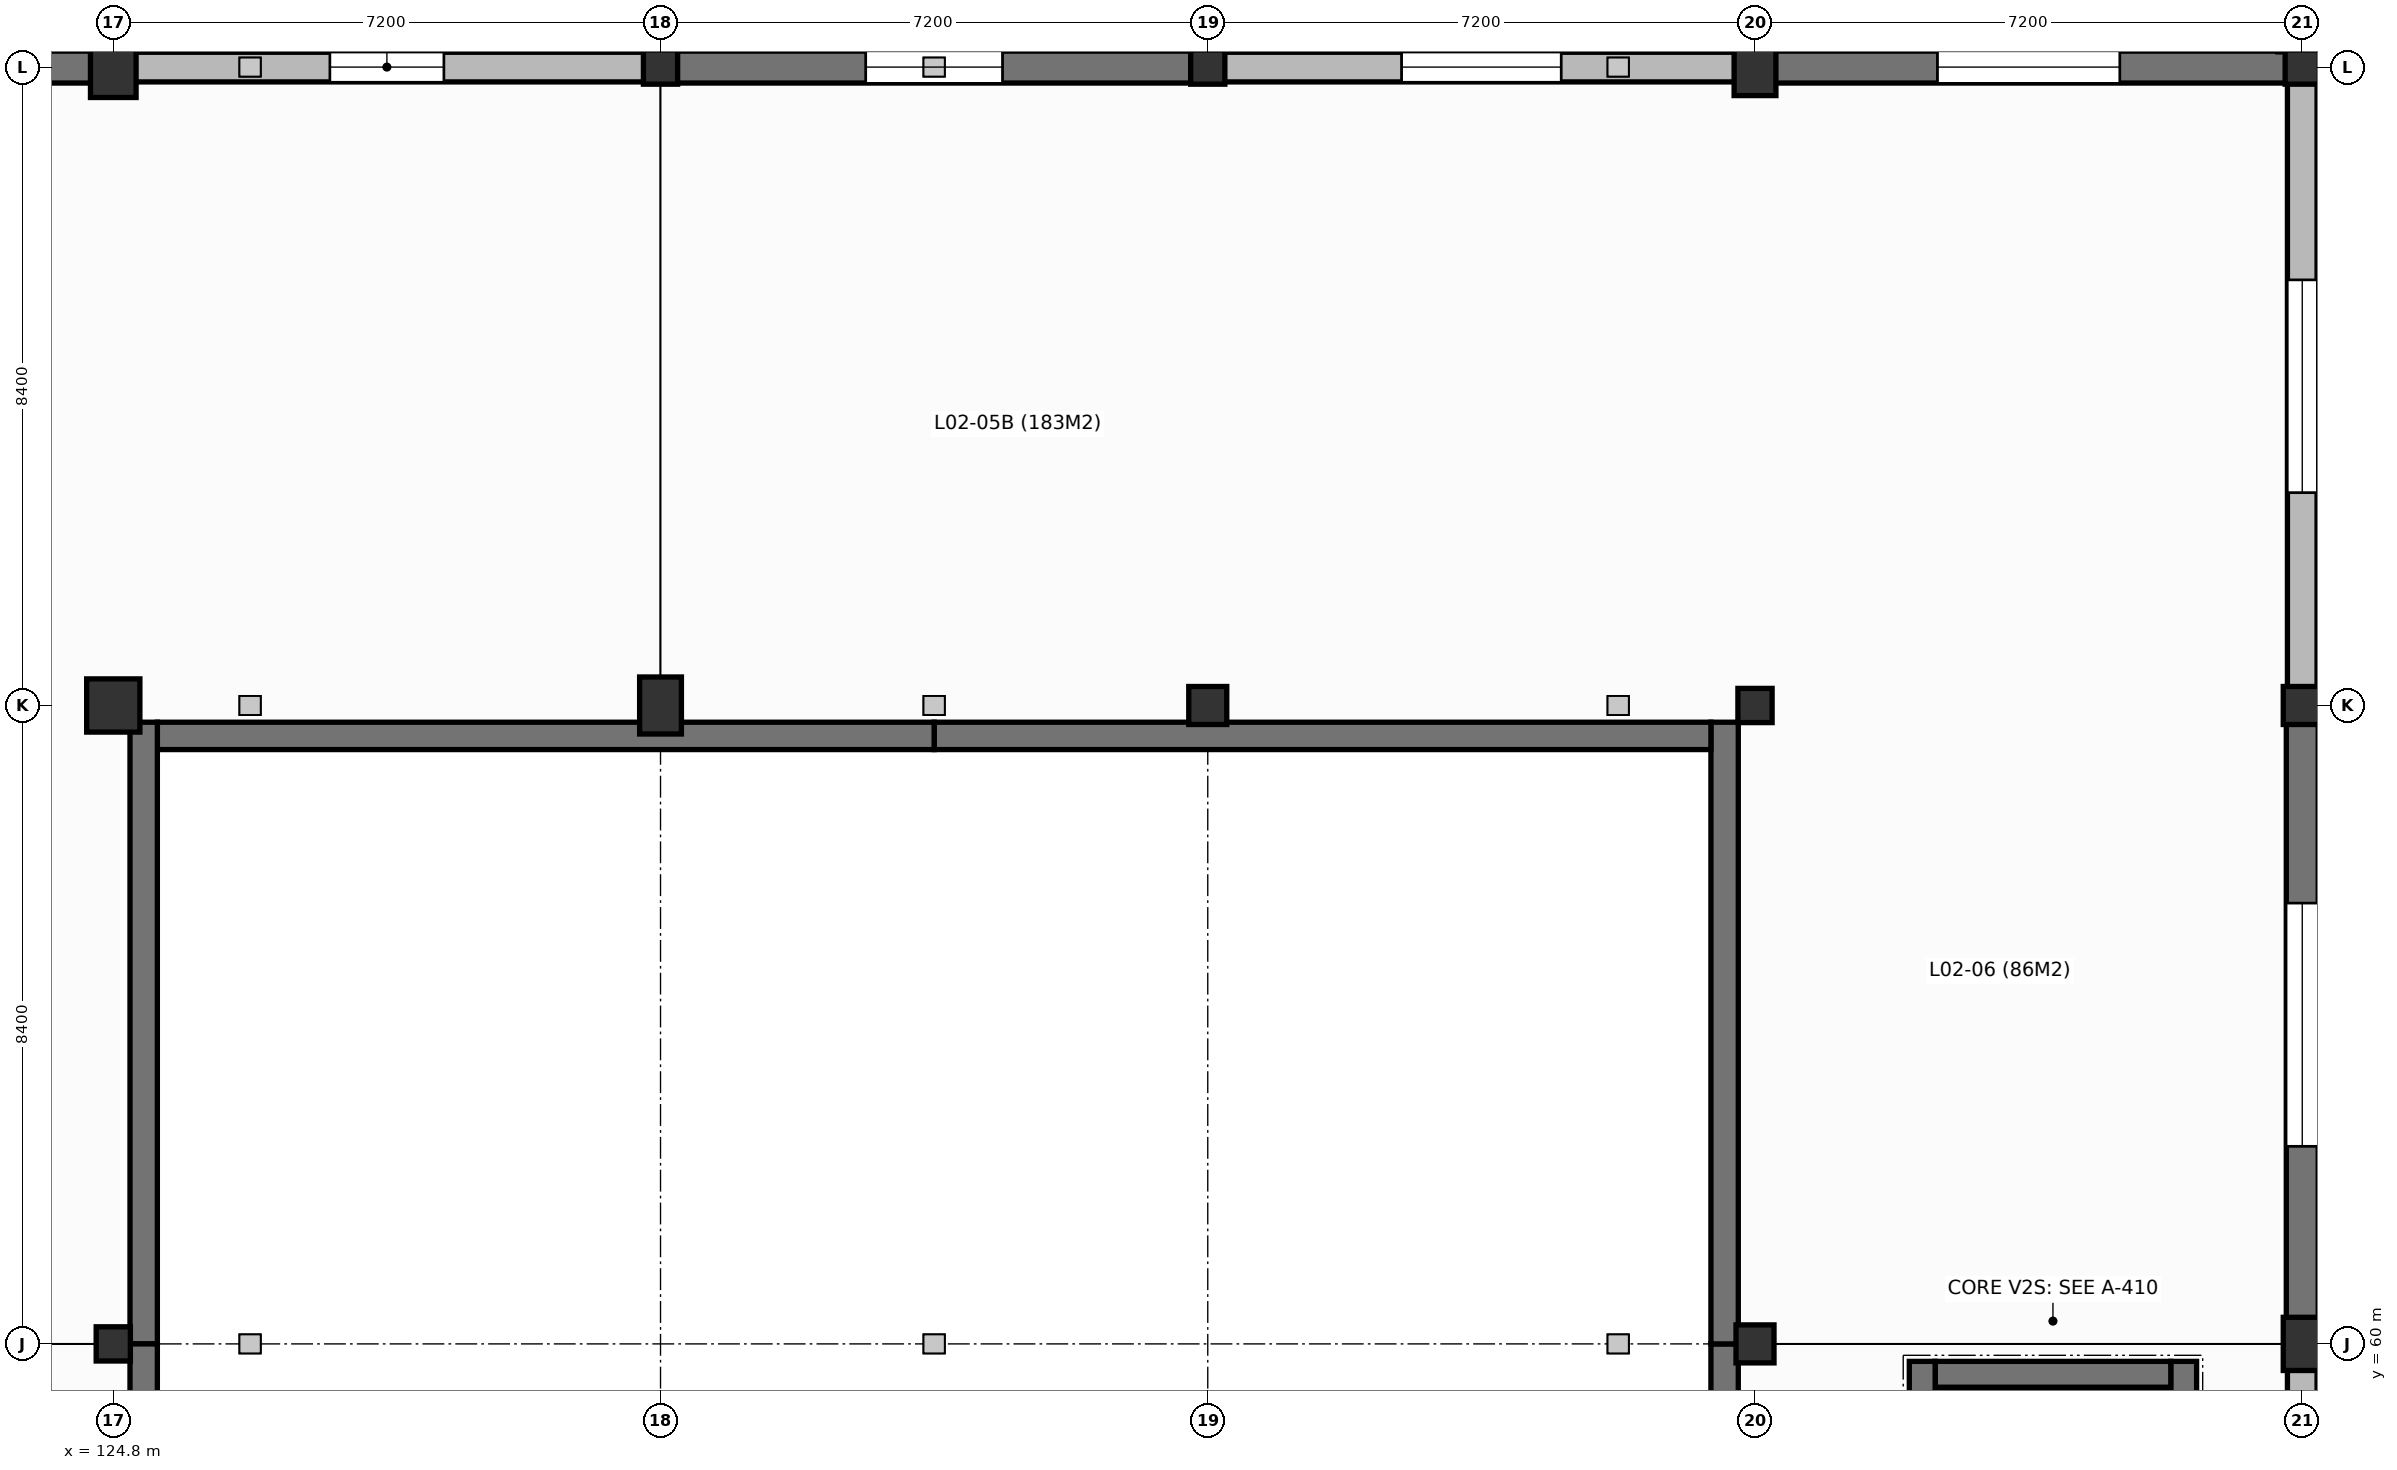
"""IFC4 building model, lengths in metres.
Left out: names, types, materials, properties, quantities, classifications, styles, units other than length and angle.
Written with IfcOpenShell. Run it as: python <this file> out.ifc"""

import sys

from ifc_helpers import new_model, si_unit, direction, frame, frame_2d, origin, origin_2d, place, context, subcontext, project, spatial, rectangle, extrude, element, fill, save


model = new_model("IFC4")
c1 = context("Model", 3, precision=1e-05, world=origin(), true_north=direction((0.0, 1.0)))
c2 = subcontext(c1, "Body", "Model", "MODEL_VIEW")
j1 = project(units=[si_unit("LENGTHUNIT", "METRE"), si_unit("PLANEANGLEUNIT", "RADIAN")], contexts=[c1])
p1 = place(None, origin())
s1 = spatial("IfcSite", under=j1, at=p1, CompositionType="ELEMENT")
p2 = place(p1, origin())
s2 = spatial("IfcBuilding", under=s1, at=p2, CompositionType="ELEMENT")
p3 = place(p2, frame((0.0, 0.0, 9.0)))
s3 = spatial("IfcBuildingStorey", under=s2, at=p3, CompositionType="ELEMENT", Elevation=9.0)
p4 = place(p3, frame((124.8, 60.0, 0.0), z_axis=(0.0, 0.0, 1.0), x_axis=(1.0, 0.0, 0.0)))
e1 = element("IfcColumn", 1, at=p4, inside=s3, PredefinedType="COLUMN", context=c2, shape_type="SweptSolid", body=[
    extrude(rectangle(XDim=0.45, YDim=0.45, at=origin_2d()), origin(), (0.0, 0.0, 1.0), 4.2),
])
p5 = place(p3, frame((124.8, 68.4, 0.0), z_axis=(0.0, 0.0, 1.0), x_axis=(1.0, 0.0, 0.0)))
e2 = element("IfcColumn", 2, at=p5, inside=s3, PredefinedType="COLUMN", context=c2, shape_type="SweptSolid", body=[
    extrude(rectangle(XDim=0.7, YDim=0.7, at=origin_2d()), origin(), (0.0, 0.0, 1.0), 4.2),
])
p6 = place(p3, frame((124.8, 76.8, 0.0), z_axis=(0.0, 0.0, 1.0), x_axis=(1.0, 0.0, 0.0)))
e3 = element("IfcColumn", 3, at=p6, inside=s3, PredefinedType="COLUMN", context=c2, shape_type="SweptSolid", body=[
    extrude(rectangle(XDim=0.6, YDim=0.8, at=origin_2d()), origin(), (0.0, 0.0, 1.0), 4.2),
])
p7 = place(p3, frame((132.0, 68.4, 0.0), z_axis=(0.0, 0.0, 1.0), x_axis=(1.0, 0.0, 0.0)))
e4 = element("IfcColumn", 4, at=p7, inside=s3, PredefinedType="COLUMN", context=c2, shape_type="SweptSolid", body=[
    extrude(rectangle(XDim=0.55, YDim=0.75, at=origin_2d()), origin(), (0.0, 0.0, 1.0), 4.2),
])
p8 = place(p3, frame((132.0, 76.8, 0.0), z_axis=(0.0, 0.0, 1.0), x_axis=(1.0, 0.0, 0.0)))
e5 = element("IfcColumn", 5, at=p8, inside=s3, PredefinedType="COLUMN", context=c2, shape_type="SweptSolid", body=[
    extrude(rectangle(XDim=0.45, YDim=0.45, at=origin_2d()), origin(), (0.0, 0.0, 1.0), 4.2),
])
p9 = place(p3, frame((139.2, 68.4, 0.0), z_axis=(0.0, 0.0, 1.0), x_axis=(1.0, 0.0, 0.0)))
e6 = element("IfcColumn", 6, at=p9, inside=s3, PredefinedType="COLUMN", context=c2, shape_type="SweptSolid", body=[
    extrude(rectangle(XDim=0.5, YDim=0.5, at=origin_2d()), origin(), (0.0, 0.0, 1.0), 4.2),
])
p10 = place(p3, frame((139.2, 76.8, 0.0), z_axis=(0.0, 0.0, 1.0), x_axis=(1.0, 0.0, 0.0)))
e7 = element("IfcColumn", 7, at=p10, inside=s3, PredefinedType="COLUMN", context=c2, shape_type="SweptSolid", body=[
    extrude(rectangle(XDim=0.45, YDim=0.45, at=origin_2d()), origin(), (0.0, 0.0, 1.0), 4.2),
])
p11 = place(p3, frame((146.4, 60.0, 0.0), z_axis=(0.0, 0.0, 1.0), x_axis=(1.0, 0.0, 0.0)))
e8 = element("IfcColumn", 8, at=p11, inside=s3, PredefinedType="COLUMN", context=c2, shape_type="SweptSolid", body=[
    extrude(rectangle(XDim=0.5, YDim=0.5, at=origin_2d()), origin(), (0.0, 0.0, 1.0), 4.2),
])
p12 = place(p3, frame((146.4, 68.4, 0.0), z_axis=(0.0, 0.0, 1.0), x_axis=(1.0, 0.0, 0.0)))
e9 = element("IfcColumn", 9, at=p12, inside=s3, PredefinedType="COLUMN", context=c2, shape_type="SweptSolid", body=[
    extrude(rectangle(XDim=0.45, YDim=0.45, at=origin_2d()), origin(), (0.0, 0.0, 1.0), 4.2),
])
p13 = place(p3, frame((146.4, 76.8, 0.0), z_axis=(0.0, 0.0, 1.0), x_axis=(1.0, 0.0, 0.0)))
e10 = element("IfcColumn", 10, at=p13, inside=s3, PredefinedType="COLUMN", context=c2, shape_type="SweptSolid", body=[
    extrude(rectangle(XDim=0.55, YDim=0.75, at=origin_2d()), origin(), (0.0, 0.0, 1.0), 4.2),
])
p14 = place(p3, frame((153.6, 60.0, 0.0), z_axis=(0.0, 0.0, 1.0), x_axis=(1.0, 0.0, 0.0)))
e11 = element("IfcColumn", 11, at=p14, inside=s3, PredefinedType="COLUMN", context=c2, shape_type="SweptSolid", body=[
    extrude(rectangle(XDim=0.5, YDim=0.7, at=origin_2d()), origin(), (0.0, 0.0, 1.0), 4.2),
])
p15 = place(p3, frame((153.6, 68.4, 0.0), z_axis=(0.0, 0.0, 1.0), x_axis=(1.0, 0.0, 0.0)))
e12 = element("IfcColumn", 12, at=p15, inside=s3, PredefinedType="COLUMN", context=c2, shape_type="SweptSolid", body=[
    extrude(rectangle(XDim=0.5, YDim=0.5, at=origin_2d()), origin(), (0.0, 0.0, 1.0), 4.2),
])
p16 = place(p3, frame((153.6, 76.8, 0.0), z_axis=(0.0, 0.0, 1.0), x_axis=(1.0, 0.0, 0.0)))
e13 = element("IfcColumn", 13, at=p16, inside=s3, PredefinedType="COLUMN", context=c2, shape_type="SweptSolid", body=[
    extrude(rectangle(XDim=0.45, YDim=0.45, at=origin_2d()), origin(), (0.0, 0.0, 1.0), 4.2),
])
p17 = place(p3, frame((117.6, 76.8, 0.0), z_axis=(0.0, 0.0, 1.0), x_axis=(1.0, 0.0, 0.0)))
e14 = element("IfcWall", 14, at=p17, inside=s3, PredefinedType="STANDARD", context=c2, shape_type="SweptSolid", body=[
    extrude(rectangle(XDim=7.2, YDim=0.42, at=frame_2d((3.6, 0.0))), origin(), (0.0, 0.0, 1.0), 3.84),
])
p18 = place(p17, frame((3.0, 0.0, 0.8)))
e15 = element("IfcOpeningElement", 15, at=p18, cuts=e14, PredefinedType="OPENING", context=c2, shape_type="SweptSolid", body=[
    extrude(rectangle(XDim=1.2, YDim=1.45, at=frame_2d((0.6, 0.725))), frame((0.0, 0.22, 0.0), z_axis=(0.0, -1.0, 0.0), x_axis=(1.0, 0.0, 0.0)), (0.0, 0.0, 1.0), 0.44),
])
p19 = place(p3, frame((124.8, 76.8, 0.0), z_axis=(0.0, 0.0, 1.0), x_axis=(1.0, 0.0, 0.0)))
e16 = element("IfcWall", 16, at=p19, inside=s3, PredefinedType="STANDARD", context=c2, shape_type="SweptSolid", body=[
    extrude(rectangle(XDim=7.2, YDim=0.39, at=frame_2d((3.6, 0.0))), origin(), (0.0, 0.0, 1.0), 3.19),
])
p20 = place(p19, frame((2.85, 0.0, 0.8)))
e17 = element("IfcOpeningElement", 17, at=p20, cuts=e16, PredefinedType="OPENING", context=c2, shape_type="SweptSolid", body=[
    extrude(rectangle(XDim=1.5, YDim=1.45, at=frame_2d((0.75, 0.725))), frame((0.0, 0.205, 0.0), z_axis=(0.0, -1.0, 0.0), x_axis=(1.0, 0.0, 0.0)), (0.0, 0.0, 1.0), 0.41),
])
p21 = place(p3, frame((132.0, 76.8, 0.0), z_axis=(0.0, 0.0, 1.0), x_axis=(1.0, 0.0, 0.0)))
e18 = element("IfcWall", 18, at=p21, inside=s3, PredefinedType="STANDARD", context=c2, shape_type="SweptSolid", body=[
    extrude(rectangle(XDim=7.2, YDim=0.42, at=frame_2d((3.6, 0.0))), origin(), (0.0, 0.0, 1.0), 3.84),
])
p22 = place(p21, frame((2.7, 0.0, 0.8)))
e19 = element("IfcOpeningElement", 19, at=p22, cuts=e18, PredefinedType="OPENING", context=c2, shape_type="SweptSolid", body=[
    extrude(rectangle(XDim=1.8, YDim=1.45, at=frame_2d((0.9, 0.725))), frame((0.0, 0.22, 0.0), z_axis=(0.0, -1.0, 0.0), x_axis=(1.0, 0.0, 0.0)), (0.0, 0.0, 1.0), 0.44),
])
p23 = place(p3, frame((139.2, 76.8, 0.0), z_axis=(0.0, 0.0, 1.0), x_axis=(1.0, 0.0, 0.0)))
e20 = element("IfcWall", 20, at=p23, inside=s3, PredefinedType="STANDARD", context=c2, shape_type="SweptSolid", body=[
    extrude(rectangle(XDim=7.2, YDim=0.39, at=frame_2d((3.6, 0.0))), origin(), (0.0, 0.0, 1.0), 3.09),
])
p24 = place(p23, frame((2.55, 0.0, 0.8)))
e21 = element("IfcOpeningElement", 21, at=p24, cuts=e20, PredefinedType="OPENING", context=c2, shape_type="SweptSolid", body=[
    extrude(rectangle(XDim=2.1, YDim=1.45, at=frame_2d((1.05, 0.725))), frame((0.0, 0.205, 0.0), z_axis=(0.0, -1.0, 0.0), x_axis=(1.0, 0.0, 0.0)), (0.0, 0.0, 1.0), 0.41),
])
p25 = place(p3, frame((146.4, 76.8, 0.0), z_axis=(0.0, 0.0, 1.0), x_axis=(1.0, 0.0, 0.0)))
e22 = element("IfcWall", 22, at=p25, inside=s3, PredefinedType="STANDARD", context=c2, shape_type="SweptSolid", body=[
    extrude(rectangle(XDim=7.2, YDim=0.42, at=frame_2d((3.6, 0.0))), origin(), (0.0, 0.0, 1.0), 3.84),
])
p26 = place(p25, frame((2.4, 0.0, 0.8)))
e23 = element("IfcOpeningElement", 23, at=p26, cuts=e22, PredefinedType="OPENING", context=c2, shape_type="SweptSolid", body=[
    extrude(rectangle(XDim=2.4, YDim=1.45, at=frame_2d((1.2, 0.725))), frame((0.0, 0.22, 0.0), z_axis=(0.0, -1.0, 0.0), x_axis=(1.0, 0.0, 0.0)), (0.0, 0.0, 1.0), 0.44),
])
p27 = place(p3, frame((153.6, 76.8, 0.0), z_axis=(0.0, 0.0, 1.0), x_axis=(0.0, -1.0, 0.0)))
e24 = element("IfcWall", 24, at=p27, inside=s3, PredefinedType="STANDARD", context=c2, shape_type="SweptSolid", body=[
    extrude(rectangle(XDim=8.4, YDim=0.39, at=frame_2d((4.2, 0.0))), origin(), (0.0, 0.0, 1.0), 2.64),
])
p28 = place(p27, frame((2.8, 0.0, 0.8)))
e25 = element("IfcOpeningElement", 25, at=p28, cuts=e24, PredefinedType="OPENING", context=c2, shape_type="SweptSolid", body=[
    extrude(rectangle(XDim=2.8, YDim=1.6, at=frame_2d((1.4, 0.8))), frame((0.0, 0.205, 0.0), z_axis=(0.0, -1.0, 0.0), x_axis=(1.0, 0.0, 0.0)), (0.0, 0.0, 1.0), 0.41),
])
p29 = place(p3, frame((153.6, 68.4, 0.0), z_axis=(0.0, 0.0, 1.0), x_axis=(0.0, -1.0, 0.0)))
e26 = element("IfcWall", 26, at=p29, inside=s3, PredefinedType="STANDARD", context=c2, shape_type="SweptSolid", body=[
    extrude(rectangle(XDim=8.4, YDim=0.42, at=frame_2d((4.2, 0.0))), origin(), (0.0, 0.0, 1.0), 3.84),
])
p30 = place(p29, frame((2.6, 0.0, 0.8)))
e27 = element("IfcOpeningElement", 27, at=p30, cuts=e26, PredefinedType="OPENING", context=c2, shape_type="SweptSolid", body=[
    extrude(rectangle(XDim=3.2, YDim=1.6, at=frame_2d((1.6, 0.8))), frame((0.0, 0.22, 0.0), z_axis=(0.0, -1.0, 0.0), x_axis=(1.0, 0.0, 0.0)), (0.0, 0.0, 1.0), 0.44),
])
p31 = place(p3, frame((153.6, 60.0, 0.0), z_axis=(0.0, 0.0, 1.0), x_axis=(0.0, -1.0, 0.0)))
e28 = element("IfcWall", 28, at=p31, inside=s3, PredefinedType="STANDARD", context=c2, shape_type="SweptSolid", body=[
    extrude(rectangle(XDim=8.4, YDim=0.39, at=frame_2d((4.2, 0.0))), origin(), (0.0, 0.0, 1.0), 2.74),
])
p32 = place(p3, frame((152.04, 51.83, 0.0), z_axis=(0.0, 0.0, 1.0), x_axis=(0.0, 1.0, 0.0)))
e29 = element("IfcWall", 29, at=p32, inside=s3, PredefinedType="SHEAR", context=c2, shape_type="SweptSolid", body=[
    extrude(rectangle(XDim=7.94, YDim=0.34, at=frame_2d((3.97, 0.0))), origin(), (0.0, 0.0, 1.0), 4.2),
])
p33 = place(p3, frame((151.87, 59.6, 0.0), z_axis=(0.0, 0.0, 1.0), x_axis=(-1.0, 0.0, 0.0)))
e30 = element("IfcWall", 30, at=p33, inside=s3, PredefinedType="SHEAR", context=c2, shape_type="SweptSolid", body=[
    extrude(rectangle(XDim=3.1, YDim=0.34, at=frame_2d((1.55, 0.0))), origin(), (0.0, 0.0, 1.0), 4.2),
])
p34 = place(p3, frame((148.6, 59.77, 0.0), z_axis=(0.0, 0.0, 1.0), x_axis=(0.0, -1.0, 0.0)))
e31 = element("IfcWall", 31, at=p34, inside=s3, PredefinedType="SHEAR", context=c2, shape_type="SweptSolid", body=[
    extrude(rectangle(XDim=7.94, YDim=0.34, at=frame_2d((3.97, 0.0))), origin(), (0.0, 0.0, 1.0), 4.2),
])
for number, where, z_axis, x_axis in (
    (32, (146.0, 51.82, 0.0), (0.0, 0.0, 1.0), (0.0, 1.0, 0.0)),
    (33, (146.0, 60.0, 0.0), (0.0, 0.0, 1.0), (0.0, 1.0, 0.0)),
):
    element("IfcWall", number, at=place(p3, frame(where, z_axis=z_axis, x_axis=x_axis)), inside=s3, PredefinedType="SHEAR", context=c2, shape_type="SweptSolid", body=[
        extrude(rectangle(XDim=8.18, YDim=0.36, at=frame_2d((4.09, 0.0))), origin(), (0.0, 0.0, 1.0), 4.2),
    ])
p35 = place(p3, frame((145.82, 68.0, 0.0), z_axis=(0.0, 0.0, 1.0), x_axis=(-1.0, 0.0, 0.0)))
e34 = element("IfcWall", 34, at=p35, inside=s3, PredefinedType="SHEAR", context=c2, shape_type="SweptSolid", body=[
    extrude(rectangle(XDim=10.22, YDim=0.36, at=frame_2d((5.11, 0.0))), origin(), (0.0, 0.0, 1.0), 4.2),
])
p36 = place(p3, frame((135.6, 68.0, 0.0), z_axis=(0.0, 0.0, 1.0), x_axis=(-1.0, 0.0, 0.0)))
e35 = element("IfcWall", 35, at=p36, inside=s3, PredefinedType="SHEAR", context=c2, shape_type="SweptSolid", body=[
    extrude(rectangle(XDim=10.22, YDim=0.36, at=frame_2d((5.11, 0.0))), origin(), (0.0, 0.0, 1.0), 4.2),
])
for number, where, z_axis, x_axis in (
    (36, (125.2, 68.18, 0.0), (0.0, 0.0, 1.0), (0.0, -1.0, 0.0)),
    (37, (125.2, 60.0, 0.0), (0.0, 0.0, 1.0), (0.0, -1.0, 0.0)),
):
    element("IfcWall", number, at=place(p3, frame(where, z_axis=z_axis, x_axis=x_axis)), inside=s3, PredefinedType="SHEAR", context=c2, shape_type="SweptSolid", body=[
        extrude(rectangle(XDim=8.18, YDim=0.36, at=frame_2d((4.09, 0.0))), origin(), (0.0, 0.0, 1.0), 4.2),
    ])
p37 = place(p20, origin())
e38 = element("IfcWindow", 38, at=p37, inside=s3, PartitioningType="SINGLE_PANEL", PredefinedType="WINDOW", context=c2, shape_type="SweptSolid", body=[
    extrude(rectangle(XDim=1.5, YDim=1.45, at=frame_2d((0.75, 0.725))), frame((0.0, 0.03, 0.0), z_axis=(0.0, -1.0, 0.0), x_axis=(1.0, 0.0, 0.0)), (0.0, 0.0, 1.0), 0.06),
])
fill(e17, e38)
p38 = place(p22, origin())
e39 = element("IfcWindow", 39, at=p38, inside=s3, PartitioningType="SINGLE_PANEL", PredefinedType="WINDOW", context=c2, shape_type="SweptSolid", body=[
    extrude(rectangle(XDim=1.8, YDim=1.45, at=frame_2d((0.9, 0.725))), frame((0.0, 0.03, 0.0), z_axis=(0.0, -1.0, 0.0), x_axis=(1.0, 0.0, 0.0)), (0.0, 0.0, 1.0), 0.06),
])
fill(e19, e39)
p39 = place(p24, origin())
e40 = element("IfcWindow", 40, at=p39, inside=s3, PartitioningType="SINGLE_PANEL", PredefinedType="WINDOW", context=c2, shape_type="SweptSolid", body=[
    extrude(rectangle(XDim=2.1, YDim=1.45, at=frame_2d((1.05, 0.725))), frame((0.0, 0.03, 0.0), z_axis=(0.0, -1.0, 0.0), x_axis=(1.0, 0.0, 0.0)), (0.0, 0.0, 1.0), 0.06),
])
fill(e21, e40)
p40 = place(p26, origin())
e41 = element("IfcWindow", 41, at=p40, inside=s3, PartitioningType="TRIPLE_PANEL_VERTICAL", PredefinedType="WINDOW", context=c2, shape_type="SweptSolid", body=[
    extrude(rectangle(XDim=2.4, YDim=1.45, at=frame_2d((1.2, 0.725))), frame((0.0, 0.03, 0.0), z_axis=(0.0, -1.0, 0.0), x_axis=(1.0, 0.0, 0.0)), (0.0, 0.0, 1.0), 0.06),
])
fill(e23, e41)
p41 = place(p28, origin())
e42 = element("IfcWindow", 42, at=p41, inside=s3, PartitioningType="TRIPLE_PANEL_VERTICAL", PredefinedType="WINDOW", context=c2, shape_type="SweptSolid", body=[
    extrude(rectangle(XDim=2.8, YDim=1.6, at=frame_2d((1.4, 0.8))), frame((0.0, 0.03, 0.0), z_axis=(0.0, -1.0, 0.0), x_axis=(1.0, 0.0, 0.0)), (0.0, 0.0, 1.0), 0.06),
])
fill(e25, e42)
p42 = place(p30, origin())
e43 = element("IfcWindow", 43, at=p42, inside=s3, PartitioningType="TRIPLE_PANEL_VERTICAL", PredefinedType="WINDOW", context=c2, shape_type="SweptSolid", body=[
    extrude(rectangle(XDim=3.2, YDim=1.6, at=frame_2d((1.6, 0.8))), frame((0.0, 0.03, 0.0), z_axis=(0.0, -1.0, 0.0), x_axis=(1.0, 0.0, 0.0)), (0.0, 0.0, 1.0), 0.06),
])
fill(e27, e43)
save(model, sys.argv[1])
